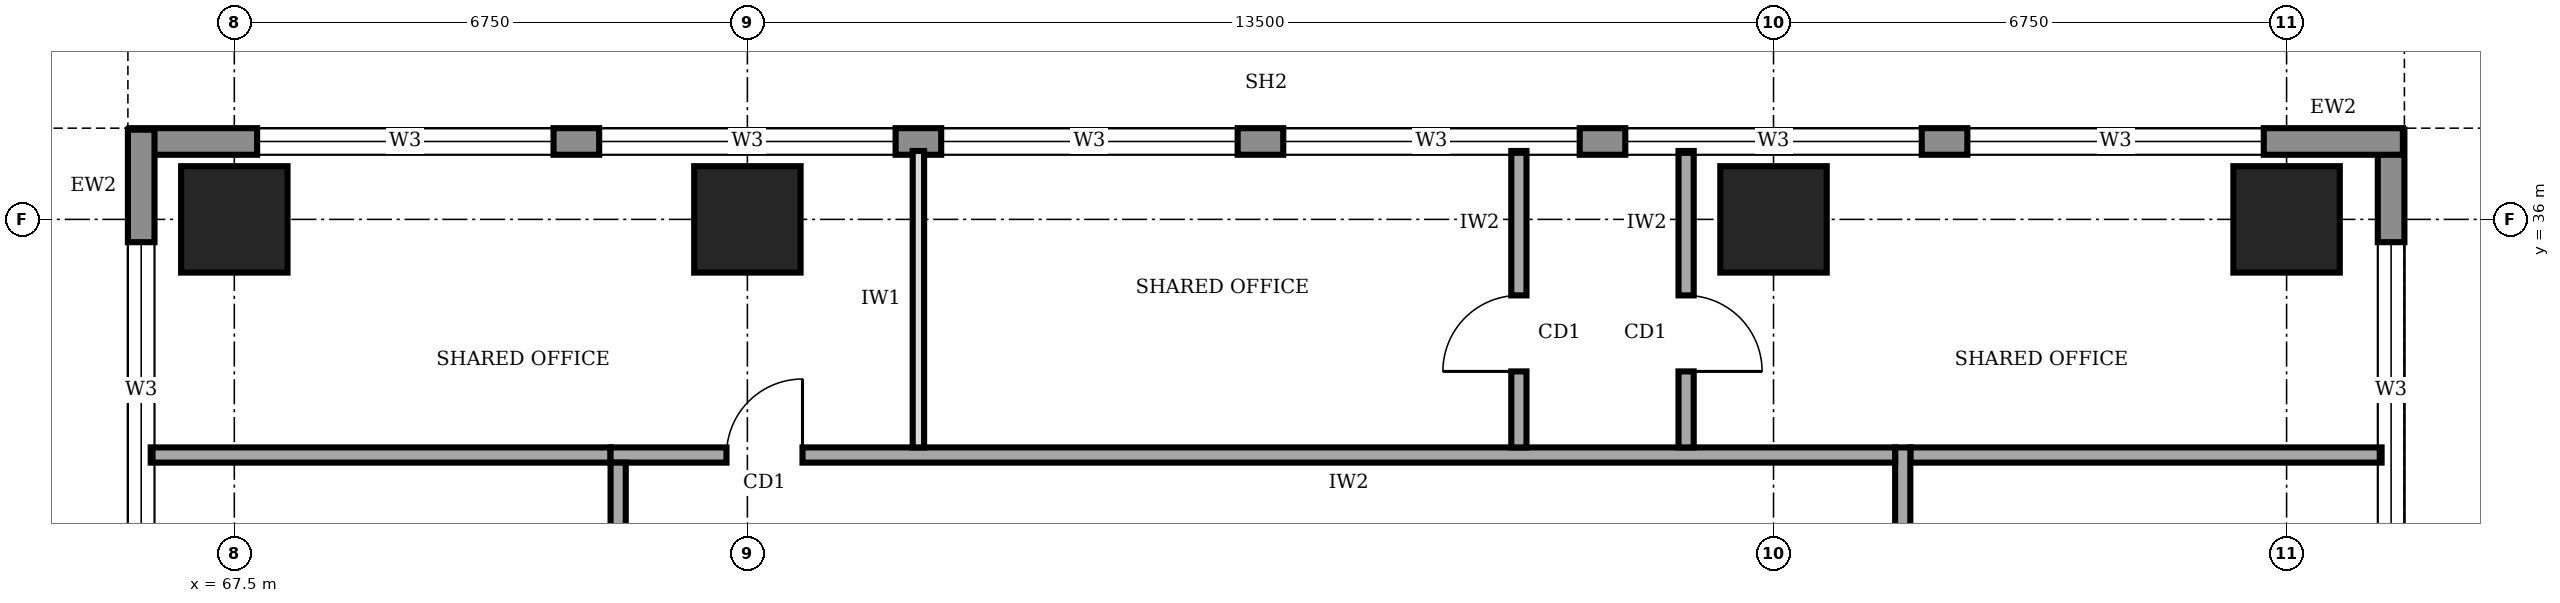
"""IFC4 building model, lengths in metres.
Left out: names, types, materials, properties, quantities, classifications, styles, units other than length and angle.
Written with IfcOpenShell. Run it as: python <this file> out.ifc"""

import sys

from ifc_helpers import new_model, si_unit, direction, frame, frame_2d, origin, origin_2d, place, context, subcontext, project, spatial, rectangle, extrude, element, fill, save


model = new_model("IFC4")
c1 = context("Model", 3, precision=1e-05, world=origin(), true_north=direction((0.0, 1.0)))
c2 = subcontext(c1, "Body", "Model", "MODEL_VIEW")
j1 = project(units=[si_unit("LENGTHUNIT", "METRE"), si_unit("PLANEANGLEUNIT", "RADIAN")], contexts=[c1])
p1 = place(None, origin())
s1 = spatial("IfcSite", under=j1, at=p1, CompositionType="ELEMENT")
p2 = place(p1, origin())
s2 = spatial("IfcBuilding", under=s1, at=p2, CompositionType="ELEMENT")
p3 = place(p2, frame((0.0, 0.0, 189.0)))
s3 = spatial("IfcBuildingStorey", under=s2, at=p3, CompositionType="ELEMENT", Elevation=189.0)
for number, where, z_axis, x_axis in (
    (1, (67.5, 36.0, 0.0), (0.0, 0.0, 1.0), (1.0, 0.0, 0.0)),
    (2, (74.25, 36.0, 0.0), (0.0, 0.0, 1.0), (1.0, 0.0, 0.0)),
    (3, (87.75, 36.0, 0.0), (0.0, 0.0, 1.0), (1.0, 0.0, 0.0)),
    (4, (94.5, 36.0, 0.0), (0.0, 0.0, 1.0), (1.0, 0.0, 0.0)),
):
    element("IfcColumn", number, at=place(p3, frame(where, z_axis=z_axis, x_axis=x_axis)), inside=s3, PredefinedType="COLUMN", context=c2, shape_type="SweptSolid", body=[
        extrude(rectangle(XDim=1.4, YDim=1.4, at=origin_2d()), origin(), (0.0, 0.0, 1.0), 4.0),
    ])
p4 = place(p3, frame((95.875, 3.32, 0.0), z_axis=(0.0, 0.0, 1.0), x_axis=(0.0, 1.0, 0.0)))
e5 = element("IfcWall", 5, at=p4, inside=s3, PredefinedType="STANDARD", context=c2, shape_type="SweptSolid", body=[
    extrude(rectangle(XDim=33.86, YDim=0.35, at=frame_2d((16.93, 0.0))), origin(), (0.0, 0.0, 1.0), 3.75),
])
p5 = place(p4, frame((1.48, 0.0, 0.95)))
e6 = element("IfcOpeningElement", 6, at=p5, cuts=e5, PredefinedType="OPENING", context=c2, shape_type="SweptSolid", body=[
    extrude(rectangle(XDim=3.9, YDim=1.8, at=frame_2d((1.95, 0.9))), frame((0.0, 0.185, 0.0), z_axis=(0.0, -1.0, 0.0), x_axis=(1.0, 0.0, 0.0)), (0.0, 0.0, 1.0), 0.37),
])
p6 = place(p4, frame((5.98, 0.0, 0.95)))
e7 = element("IfcOpeningElement", 7, at=p6, cuts=e5, PredefinedType="OPENING", context=c2, shape_type="SweptSolid", body=[
    extrude(rectangle(XDim=3.9, YDim=1.8, at=frame_2d((1.95, 0.9))), frame((0.0, 0.185, 0.0), z_axis=(0.0, -1.0, 0.0), x_axis=(1.0, 0.0, 0.0)), (0.0, 0.0, 1.0), 0.37),
])
p7 = place(p4, frame((10.48, 0.0, 0.95)))
e8 = element("IfcOpeningElement", 8, at=p7, cuts=e5, PredefinedType="OPENING", context=c2, shape_type="SweptSolid", body=[
    extrude(rectangle(XDim=3.9, YDim=1.8, at=frame_2d((1.95, 0.9))), frame((0.0, 0.185, 0.0), z_axis=(0.0, -1.0, 0.0), x_axis=(1.0, 0.0, 0.0)), (0.0, 0.0, 1.0), 0.37),
])
p8 = place(p4, frame((14.98, 0.0, 0.95)))
e9 = element("IfcOpeningElement", 9, at=p8, cuts=e5, PredefinedType="OPENING", context=c2, shape_type="SweptSolid", body=[
    extrude(rectangle(XDim=3.9, YDim=1.8, at=frame_2d((1.95, 0.9))), frame((0.0, 0.185, 0.0), z_axis=(0.0, -1.0, 0.0), x_axis=(1.0, 0.0, 0.0)), (0.0, 0.0, 1.0), 0.37),
])
p9 = place(p4, frame((19.48, 0.0, 0.95)))
e10 = element("IfcOpeningElement", 10, at=p9, cuts=e5, PredefinedType="OPENING", context=c2, shape_type="SweptSolid", body=[
    extrude(rectangle(XDim=3.9, YDim=1.8, at=frame_2d((1.95, 0.9))), frame((0.0, 0.185, 0.0), z_axis=(0.0, -1.0, 0.0), x_axis=(1.0, 0.0, 0.0)), (0.0, 0.0, 1.0), 0.37),
])
p10 = place(p4, frame((23.98, 0.0, 0.95)))
e11 = element("IfcOpeningElement", 11, at=p10, cuts=e5, PredefinedType="OPENING", context=c2, shape_type="SweptSolid", body=[
    extrude(rectangle(XDim=3.9, YDim=1.8, at=frame_2d((1.95, 0.9))), frame((0.0, 0.185, 0.0), z_axis=(0.0, -1.0, 0.0), x_axis=(1.0, 0.0, 0.0)), (0.0, 0.0, 1.0), 0.37),
])
p11 = place(p4, frame((28.48, 0.0, 0.95)))
e12 = element("IfcOpeningElement", 12, at=p11, cuts=e5, PredefinedType="OPENING", context=c2, shape_type="SweptSolid", body=[
    extrude(rectangle(XDim=3.9, YDim=1.8, at=frame_2d((1.95, 0.9))), frame((0.0, 0.185, 0.0), z_axis=(0.0, -1.0, 0.0), x_axis=(1.0, 0.0, 0.0)), (0.0, 0.0, 1.0), 0.37),
])
p12 = place(p3, frame((96.03, 37.025, 0.0), z_axis=(0.0, 0.0, 1.0), x_axis=(-1.0, 0.0, 0.0)))
e13 = element("IfcWall", 13, at=p12, inside=s3, PredefinedType="STANDARD", context=c2, shape_type="SweptSolid", body=[
    extrude(rectangle(XDim=29.91, YDim=0.35, at=frame_2d((14.955, 0.0))), origin(), (0.0, 0.0, 1.0), 3.75),
])
p13 = place(p12, frame((24.33, 0.0, 0.95)))
e14 = element("IfcOpeningElement", 14, at=p13, cuts=e13, PredefinedType="OPENING", context=c2, shape_type="SweptSolid", body=[
    extrude(rectangle(XDim=3.9, YDim=1.8, at=frame_2d((1.95, 0.9))), frame((0.0, 0.185, 0.0), z_axis=(0.0, -1.0, 0.0), x_axis=(1.0, 0.0, 0.0)), (0.0, 0.0, 1.0), 0.37),
])
p14 = place(p12, frame((19.83, 0.0, 0.95)))
e15 = element("IfcOpeningElement", 15, at=p14, cuts=e13, PredefinedType="OPENING", context=c2, shape_type="SweptSolid", body=[
    extrude(rectangle(XDim=3.9, YDim=1.8, at=frame_2d((1.95, 0.9))), frame((0.0, 0.185, 0.0), z_axis=(0.0, -1.0, 0.0), x_axis=(1.0, 0.0, 0.0)), (0.0, 0.0, 1.0), 0.37),
])
p15 = place(p12, frame((15.33, 0.0, 0.95)))
e16 = element("IfcOpeningElement", 16, at=p15, cuts=e13, PredefinedType="OPENING", context=c2, shape_type="SweptSolid", body=[
    extrude(rectangle(XDim=3.9, YDim=1.8, at=frame_2d((1.95, 0.9))), frame((0.0, 0.185, 0.0), z_axis=(0.0, -1.0, 0.0), x_axis=(1.0, 0.0, 0.0)), (0.0, 0.0, 1.0), 0.37),
])
p16 = place(p12, frame((10.83, 0.0, 0.95)))
e17 = element("IfcOpeningElement", 17, at=p16, cuts=e13, PredefinedType="OPENING", context=c2, shape_type="SweptSolid", body=[
    extrude(rectangle(XDim=3.9, YDim=1.8, at=frame_2d((1.95, 0.9))), frame((0.0, 0.185, 0.0), z_axis=(0.0, -1.0, 0.0), x_axis=(1.0, 0.0, 0.0)), (0.0, 0.0, 1.0), 0.37),
])
p17 = place(p12, frame((6.33, 0.0, 0.95)))
e18 = element("IfcOpeningElement", 18, at=p17, cuts=e13, PredefinedType="OPENING", context=c2, shape_type="SweptSolid", body=[
    extrude(rectangle(XDim=3.9, YDim=1.8, at=frame_2d((1.95, 0.9))), frame((0.0, 0.185, 0.0), z_axis=(0.0, -1.0, 0.0), x_axis=(1.0, 0.0, 0.0)), (0.0, 0.0, 1.0), 0.37),
])
p18 = place(p12, frame((1.83, 0.0, 0.95)))
e19 = element("IfcOpeningElement", 19, at=p18, cuts=e13, PredefinedType="OPENING", context=c2, shape_type="SweptSolid", body=[
    extrude(rectangle(XDim=3.9, YDim=1.8, at=frame_2d((1.95, 0.9))), frame((0.0, 0.185, 0.0), z_axis=(0.0, -1.0, 0.0), x_axis=(1.0, 0.0, 0.0)), (0.0, 0.0, 1.0), 0.37),
])
p19 = place(p3, frame((66.275, 37.18, 0.0), z_axis=(0.0, 0.0, 1.0), x_axis=(0.0, -1.0, 0.0)))
e20 = element("IfcWall", 20, at=p19, inside=s3, PredefinedType="STANDARD", context=c2, shape_type="SweptSolid", body=[
    extrude(rectangle(XDim=33.86, YDim=0.35, at=frame_2d((16.93, 0.0))), origin(), (0.0, 0.0, 1.0), 3.75),
])
p20 = place(p19, frame((28.48, 0.0, 0.95)))
e21 = element("IfcOpeningElement", 21, at=p20, cuts=e20, PredefinedType="OPENING", context=c2, shape_type="SweptSolid", body=[
    extrude(rectangle(XDim=3.9, YDim=1.8, at=frame_2d((1.95, 0.9))), frame((0.0, 0.185, 0.0), z_axis=(0.0, -1.0, 0.0), x_axis=(1.0, 0.0, 0.0)), (0.0, 0.0, 1.0), 0.37),
])
p21 = place(p19, frame((23.98, 0.0, 0.95)))
e22 = element("IfcOpeningElement", 22, at=p21, cuts=e20, PredefinedType="OPENING", context=c2, shape_type="SweptSolid", body=[
    extrude(rectangle(XDim=3.9, YDim=1.8, at=frame_2d((1.95, 0.9))), frame((0.0, 0.185, 0.0), z_axis=(0.0, -1.0, 0.0), x_axis=(1.0, 0.0, 0.0)), (0.0, 0.0, 1.0), 0.37),
])
p22 = place(p19, frame((19.48, 0.0, 0.95)))
e23 = element("IfcOpeningElement", 23, at=p22, cuts=e20, PredefinedType="OPENING", context=c2, shape_type="SweptSolid", body=[
    extrude(rectangle(XDim=3.9, YDim=1.8, at=frame_2d((1.95, 0.9))), frame((0.0, 0.185, 0.0), z_axis=(0.0, -1.0, 0.0), x_axis=(1.0, 0.0, 0.0)), (0.0, 0.0, 1.0), 0.37),
])
p23 = place(p19, frame((14.98, 0.0, 0.95)))
e24 = element("IfcOpeningElement", 24, at=p23, cuts=e20, PredefinedType="OPENING", context=c2, shape_type="SweptSolid", body=[
    extrude(rectangle(XDim=3.9, YDim=1.8, at=frame_2d((1.95, 0.9))), frame((0.0, 0.185, 0.0), z_axis=(0.0, -1.0, 0.0), x_axis=(1.0, 0.0, 0.0)), (0.0, 0.0, 1.0), 0.37),
])
p24 = place(p19, frame((10.48, 0.0, 0.95)))
e25 = element("IfcOpeningElement", 25, at=p24, cuts=e20, PredefinedType="OPENING", context=c2, shape_type="SweptSolid", body=[
    extrude(rectangle(XDim=3.9, YDim=1.8, at=frame_2d((1.95, 0.9))), frame((0.0, 0.185, 0.0), z_axis=(0.0, -1.0, 0.0), x_axis=(1.0, 0.0, 0.0)), (0.0, 0.0, 1.0), 0.37),
])
p25 = place(p19, frame((5.98, 0.0, 0.95)))
e26 = element("IfcOpeningElement", 26, at=p25, cuts=e20, PredefinedType="OPENING", context=c2, shape_type="SweptSolid", body=[
    extrude(rectangle(XDim=3.9, YDim=1.8, at=frame_2d((1.95, 0.9))), frame((0.0, 0.185, 0.0), z_axis=(0.0, -1.0, 0.0), x_axis=(1.0, 0.0, 0.0)), (0.0, 0.0, 1.0), 0.37),
])
p26 = place(p19, frame((1.48, 0.0, 0.95)))
e27 = element("IfcOpeningElement", 27, at=p26, cuts=e20, PredefinedType="OPENING", context=c2, shape_type="SweptSolid", body=[
    extrude(rectangle(XDim=3.9, YDim=1.8, at=frame_2d((1.95, 0.9))), frame((0.0, 0.185, 0.0), z_axis=(0.0, -1.0, 0.0), x_axis=(1.0, 0.0, 0.0)), (0.0, 0.0, 1.0), 0.37),
])
p27 = place(p3, frame((89.45, 7.7, 0.0), z_axis=(0.0, 0.0, 1.0), x_axis=(0.0, 1.0, 0.0)))
e28 = element("IfcWall", 28, at=p27, inside=s3, PredefinedType="SOLIDWALL", context=c2, shape_type="SweptSolid", body=[
    extrude(rectangle(XDim=25.3, YDim=0.2, at=frame_2d((12.65, 0.0))), origin(), (0.0, 0.0, 1.0), 3.75),
])
p28 = place(p27, frame((2.3, 0.0, 0.0)))
e29 = element("IfcOpeningElement", 29, at=p28, cuts=e28, PredefinedType="OPENING", context=c2, shape_type="SweptSolid", body=[
    extrude(rectangle(XDim=1.0, YDim=2.1, at=frame_2d((0.5, 1.05))), frame((0.0, 0.11, 0.0), z_axis=(0.0, -1.0, 0.0), x_axis=(1.0, 0.0, 0.0)), (0.0, 0.0, 1.0), 0.22),
])
p29 = place(p27, frame((6.4, 0.0, 0.0)))
e30 = element("IfcOpeningElement", 30, at=p29, cuts=e28, PredefinedType="OPENING", context=c2, shape_type="SweptSolid", body=[
    extrude(rectangle(XDim=1.0, YDim=2.1, at=frame_2d((0.5, 1.05))), frame((0.0, 0.11, 0.0), z_axis=(0.0, -1.0, 0.0), x_axis=(1.0, 0.0, 0.0)), (0.0, 0.0, 1.0), 0.22),
])
p30 = place(p27, frame((9.5, 0.0, 0.0)))
e31 = element("IfcOpeningElement", 31, at=p30, cuts=e28, PredefinedType="OPENING", context=c2, shape_type="SweptSolid", body=[
    extrude(rectangle(XDim=0.9, YDim=2.1, at=frame_2d((0.45, 1.05))), frame((0.0, 0.11, 0.0), z_axis=(0.0, -1.0, 0.0), x_axis=(1.0, 0.0, 0.0)), (0.0, 0.0, 1.0), 0.22),
])
p31 = place(p27, frame((12.55, 0.0, 0.0)))
e32 = element("IfcOpeningElement", 32, at=p31, cuts=e28, PredefinedType="OPENING", context=c2, shape_type="SweptSolid", body=[
    extrude(rectangle(XDim=0.9, YDim=2.1, at=frame_2d((0.45, 1.05))), frame((0.0, 0.11, 0.0), z_axis=(0.0, -1.0, 0.0), x_axis=(1.0, 0.0, 0.0)), (0.0, 0.0, 1.0), 0.22),
])
p32 = place(p27, frame((17.25, 0.0, 0.0)))
e33 = element("IfcOpeningElement", 33, at=p32, cuts=e28, PredefinedType="OPENING", context=c2, shape_type="SweptSolid", body=[
    extrude(rectangle(XDim=0.9, YDim=2.1, at=frame_2d((0.45, 1.05))), frame((0.0, 0.11, 0.0), z_axis=(0.0, -1.0, 0.0), x_axis=(1.0, 0.0, 0.0)), (0.0, 0.0, 1.0), 0.22),
])
p33 = place(p27, frame((14.6, 0.0, 0.0)))
e34 = element("IfcOpeningElement", 34, at=p33, cuts=e28, PredefinedType="OPENING", context=c2, shape_type="SweptSolid", body=[
    extrude(rectangle(XDim=1.0, YDim=2.1, at=frame_2d((0.5, 1.05))), frame((0.0, 0.11, 0.0), z_axis=(0.0, -1.0, 0.0), x_axis=(1.0, 0.0, 0.0)), (0.0, 0.0, 1.0), 0.22),
])
p34 = place(p27, frame((21.8, 0.0, 0.0)))
e35 = element("IfcOpeningElement", 35, at=p34, cuts=e28, PredefinedType="OPENING", context=c2, shape_type="SweptSolid", body=[
    extrude(rectangle(XDim=1.0, YDim=2.1, at=frame_2d((0.5, 1.05))), frame((0.0, 0.11, 0.0), z_axis=(0.0, -1.0, 0.0), x_axis=(1.0, 0.0, 0.0)), (0.0, 0.0, 1.0), 0.22),
])
p35 = place(p3, frame((89.35, 32.9, 0.0), z_axis=(0.0, 0.0, 1.0), x_axis=(-1.0, 0.0, 0.0)))
e36 = element("IfcWall", 36, at=p35, inside=s3, PredefinedType="SOLIDWALL", context=c2, shape_type="SweptSolid", body=[
    extrude(rectangle(XDim=16.9, YDim=0.2, at=frame_2d((8.45, 0.0))), origin(), (0.0, 0.0, 1.0), 3.75),
])
p36 = place(p35, frame((14.375, 0.0, 0.0)))
e37 = element("IfcOpeningElement", 37, at=p36, cuts=e36, PredefinedType="OPENING", context=c2, shape_type="SweptSolid", body=[
    extrude(rectangle(XDim=1.0, YDim=2.1, at=frame_2d((0.5, 1.05))), frame((0.0, 0.11, 0.0), z_axis=(0.0, -1.0, 0.0), x_axis=(1.0, 0.0, 0.0)), (0.0, 0.0, 1.0), 0.22),
])
p37 = place(p3, frame((72.55, 32.8, 0.0), z_axis=(0.0, 0.0, 1.0), x_axis=(0.0, -1.0, 0.0)))
e38 = element("IfcWall", 38, at=p37, inside=s3, PredefinedType="SOLIDWALL", context=c2, shape_type="SweptSolid", body=[
    extrude(rectangle(XDim=25.3, YDim=0.2, at=frame_2d((12.65, 0.0))), origin(), (0.0, 0.0, 1.0), 3.75),
])
p38 = place(p37, frame((19.55, 0.0, 0.0)))
e39 = element("IfcOpeningElement", 39, at=p38, cuts=e38, PredefinedType="OPENING", context=c2, shape_type="SweptSolid", body=[
    extrude(rectangle(XDim=1.0, YDim=2.1, at=frame_2d((0.5, 1.05))), frame((0.0, 0.11, 0.0), z_axis=(0.0, -1.0, 0.0), x_axis=(1.0, 0.0, 0.0)), (0.0, 0.0, 1.0), 0.22),
])
p39 = place(p37, frame((6.8, 0.0, 0.0)))
e40 = element("IfcOpeningElement", 40, at=p39, cuts=e38, PredefinedType="OPENING", context=c2, shape_type="SweptSolid", body=[
    extrude(rectangle(XDim=1.0, YDim=2.1, at=frame_2d((0.5, 1.05))), frame((0.0, 0.11, 0.0), z_axis=(0.0, -1.0, 0.0), x_axis=(1.0, 0.0, 0.0)), (0.0, 0.0, 1.0), 0.22),
])
p40 = place(p3, frame((84.4, 33.0, 0.0), z_axis=(0.0, 0.0, 1.0), x_axis=(0.0, 1.0, 0.0)))
e41 = element("IfcWall", 41, at=p40, inside=s3, PredefinedType="SOLIDWALL", context=c2, shape_type="SweptSolid", body=[
    extrude(rectangle(XDim=3.9, YDim=0.2, at=frame_2d((1.95, 0.0))), origin(), (0.0, 0.0, 1.0), 3.75),
])
p41 = place(p40, frame((1.0, 0.0, 0.0)))
e42 = element("IfcOpeningElement", 42, at=p41, cuts=e41, PredefinedType="OPENING", context=c2, shape_type="SweptSolid", body=[
    extrude(rectangle(XDim=1.0, YDim=2.1, at=frame_2d((0.5, 1.05))), frame((0.0, 0.11, 0.0), z_axis=(0.0, -1.0, 0.0), x_axis=(1.0, 0.0, 0.0)), (0.0, 0.0, 1.0), 0.22),
])
p42 = place(p3, frame((86.6, 36.9, 0.0), z_axis=(0.0, 0.0, 1.0), x_axis=(0.0, -1.0, 0.0)))
e43 = element("IfcWall", 43, at=p42, inside=s3, PredefinedType="SOLIDWALL", context=c2, shape_type="SweptSolid", body=[
    extrude(rectangle(XDim=3.9, YDim=0.2, at=frame_2d((1.95, 0.0))), origin(), (0.0, 0.0, 1.0), 3.75),
])
p43 = place(p42, frame((1.9, 0.0, 0.0)))
e44 = element("IfcOpeningElement", 44, at=p43, cuts=e43, PredefinedType="OPENING", context=c2, shape_type="SweptSolid", body=[
    extrude(rectangle(XDim=1.0, YDim=2.1, at=frame_2d((0.5, 1.05))), frame((0.0, 0.11, 0.0), z_axis=(0.0, -1.0, 0.0), x_axis=(1.0, 0.0, 0.0)), (0.0, 0.0, 1.0), 0.22),
])
p44 = place(p3, frame((66.4, 32.9, 0.0), z_axis=(0.0, 0.0, 1.0), x_axis=(1.0, 0.0, 0.0)))
e45 = element("IfcWall", 45, at=p44, inside=s3, PredefinedType="SOLIDWALL", context=c2, shape_type="SweptSolid", body=[
    extrude(rectangle(XDim=6.05, YDim=0.2, at=frame_2d((3.025, 0.0))), origin(), (0.0, 0.0, 1.0), 3.75),
])
p45 = place(p3, frame((89.55, 32.9, 0.0), z_axis=(0.0, 0.0, 1.0), x_axis=(1.0, 0.0, 0.0)))
e46 = element("IfcWall", 46, at=p45, inside=s3, PredefinedType="SOLIDWALL", context=c2, shape_type="SweptSolid", body=[
    extrude(rectangle(XDim=6.2, YDim=0.2, at=frame_2d((3.1, 0.0))), origin(), (0.0, 0.0, 1.0), 3.75),
])
p46 = place(p3, frame((76.5, 33.0, 0.0), z_axis=(0.0, 0.0, 1.0), x_axis=(0.0, 1.0, 0.0)))
e47 = element("IfcWall", 47, at=p46, inside=s3, PredefinedType="PARTITIONING", context=c2, shape_type="SweptSolid", body=[
    extrude(rectangle(XDim=3.9, YDim=0.15, at=frame_2d((1.95, 0.0))), origin(), (0.0, 0.0, 1.0), 3.75),
])
p47 = place(p11, origin())
e48 = element("IfcWindow", 48, at=p47, inside=s3, PartitioningType="SINGLE_PANEL", PredefinedType="WINDOW", context=c2, shape_type="SweptSolid", body=[
    extrude(rectangle(XDim=3.9, YDim=1.8, at=frame_2d((1.95, 0.9))), frame((0.0, 0.03, 0.0), z_axis=(0.0, -1.0, 0.0), x_axis=(1.0, 0.0, 0.0)), (0.0, 0.0, 1.0), 0.06),
])
fill(e12, e48)
p48 = place(p13, origin())
e49 = element("IfcWindow", 49, at=p48, inside=s3, PartitioningType="SINGLE_PANEL", PredefinedType="WINDOW", context=c2, shape_type="SweptSolid", body=[
    extrude(rectangle(XDim=3.9, YDim=1.8, at=frame_2d((1.95, 0.9))), frame((0.0, 0.03, 0.0), z_axis=(0.0, -1.0, 0.0), x_axis=(1.0, 0.0, 0.0)), (0.0, 0.0, 1.0), 0.06),
])
fill(e14, e49)
p49 = place(p14, origin())
e50 = element("IfcWindow", 50, at=p49, inside=s3, PartitioningType="SINGLE_PANEL", PredefinedType="WINDOW", context=c2, shape_type="SweptSolid", body=[
    extrude(rectangle(XDim=3.9, YDim=1.8, at=frame_2d((1.95, 0.9))), frame((0.0, 0.03, 0.0), z_axis=(0.0, -1.0, 0.0), x_axis=(1.0, 0.0, 0.0)), (0.0, 0.0, 1.0), 0.06),
])
fill(e15, e50)
p50 = place(p15, origin())
e51 = element("IfcWindow", 51, at=p50, inside=s3, PartitioningType="SINGLE_PANEL", PredefinedType="WINDOW", context=c2, shape_type="SweptSolid", body=[
    extrude(rectangle(XDim=3.9, YDim=1.8, at=frame_2d((1.95, 0.9))), frame((0.0, 0.03, 0.0), z_axis=(0.0, -1.0, 0.0), x_axis=(1.0, 0.0, 0.0)), (0.0, 0.0, 1.0), 0.06),
])
fill(e16, e51)
p51 = place(p16, origin())
e52 = element("IfcWindow", 52, at=p51, inside=s3, PartitioningType="SINGLE_PANEL", PredefinedType="WINDOW", context=c2, shape_type="SweptSolid", body=[
    extrude(rectangle(XDim=3.9, YDim=1.8, at=frame_2d((1.95, 0.9))), frame((0.0, 0.03, 0.0), z_axis=(0.0, -1.0, 0.0), x_axis=(1.0, 0.0, 0.0)), (0.0, 0.0, 1.0), 0.06),
])
fill(e17, e52)
p52 = place(p17, origin())
e53 = element("IfcWindow", 53, at=p52, inside=s3, PartitioningType="SINGLE_PANEL", PredefinedType="WINDOW", context=c2, shape_type="SweptSolid", body=[
    extrude(rectangle(XDim=3.9, YDim=1.8, at=frame_2d((1.95, 0.9))), frame((0.0, 0.03, 0.0), z_axis=(0.0, -1.0, 0.0), x_axis=(1.0, 0.0, 0.0)), (0.0, 0.0, 1.0), 0.06),
])
fill(e18, e53)
p53 = place(p18, origin())
e54 = element("IfcWindow", 54, at=p53, inside=s3, PartitioningType="SINGLE_PANEL", PredefinedType="WINDOW", context=c2, shape_type="SweptSolid", body=[
    extrude(rectangle(XDim=3.9, YDim=1.8, at=frame_2d((1.95, 0.9))), frame((0.0, 0.03, 0.0), z_axis=(0.0, -1.0, 0.0), x_axis=(1.0, 0.0, 0.0)), (0.0, 0.0, 1.0), 0.06),
])
fill(e19, e54)
p54 = place(p26, origin())
e55 = element("IfcWindow", 55, at=p54, inside=s3, PartitioningType="SINGLE_PANEL", PredefinedType="WINDOW", context=c2, shape_type="SweptSolid", body=[
    extrude(rectangle(XDim=3.9, YDim=1.8, at=frame_2d((1.95, 0.9))), frame((0.0, 0.03, 0.0), z_axis=(0.0, -1.0, 0.0), x_axis=(1.0, 0.0, 0.0)), (0.0, 0.0, 1.0), 0.06),
])
fill(e27, e55)
p55 = place(p36, frame((1.0, 0.0, 0.0), z_axis=(0.0, 0.0, 1.0), x_axis=(-1.0, 0.0, 0.0)))
e56 = element("IfcDoor", 56, at=p55, inside=s3, OperationType="SINGLE_SWING_RIGHT", PredefinedType="DOOR", context=c2, shape_type="SweptSolid", body=[
    extrude(rectangle(XDim=1.0, YDim=2.1, at=frame_2d((0.5, 1.05))), frame((0.0, 0.025, 0.0), z_axis=(0.0, -1.0, 0.0), x_axis=(1.0, 0.0, 0.0)), (0.0, 0.0, 1.0), 0.05),
])
fill(e37, e56)
p56 = place(p41, origin())
e57 = element("IfcDoor", 57, at=p56, inside=s3, OperationType="SINGLE_SWING_LEFT", PredefinedType="DOOR", context=c2, shape_type="SweptSolid", body=[
    extrude(rectangle(XDim=1.0, YDim=2.1, at=frame_2d((0.5, 1.05))), frame((0.0, 0.025, 0.0), z_axis=(0.0, -1.0, 0.0), x_axis=(1.0, 0.0, 0.0)), (0.0, 0.0, 1.0), 0.05),
])
fill(e42, e57)
p57 = place(p43, origin())
e58 = element("IfcDoor", 58, at=p57, inside=s3, OperationType="SINGLE_SWING_RIGHT", PredefinedType="DOOR", context=c2, shape_type="SweptSolid", body=[
    extrude(rectangle(XDim=1.0, YDim=2.1, at=frame_2d((0.5, 1.05))), frame((0.0, 0.025, 0.0), z_axis=(0.0, -1.0, 0.0), x_axis=(1.0, 0.0, 0.0)), (0.0, 0.0, 1.0), 0.05),
])
fill(e44, e58)
save(model, sys.argv[1])
